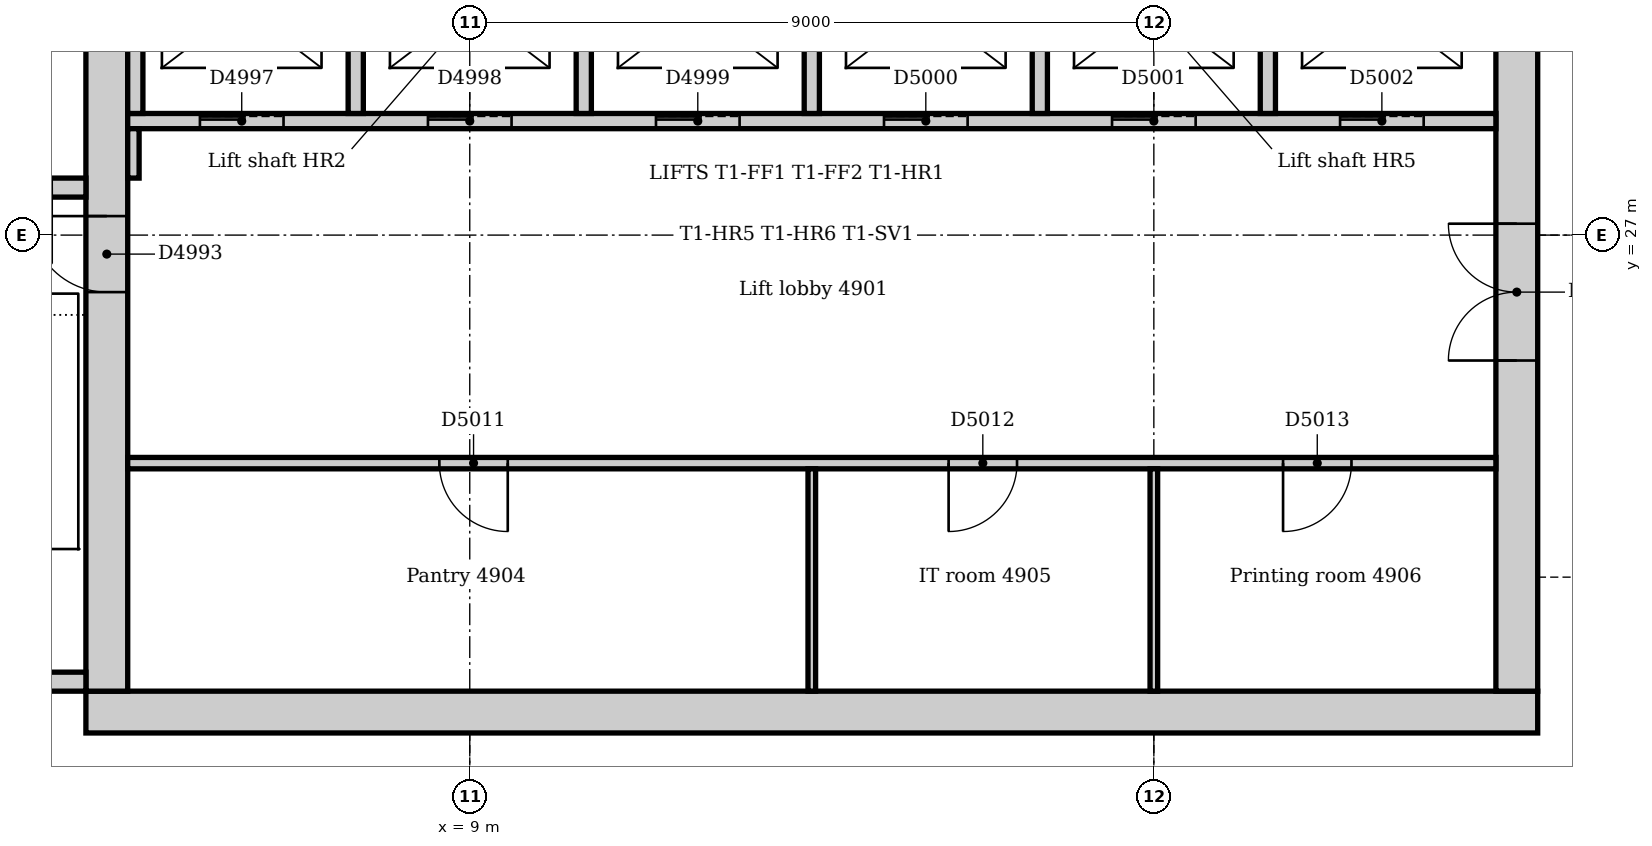
"""IFC4 building model, lengths in metres.
Left out: names, types, materials, properties, quantities, classifications, styles, units other than length and angle.
Written with IfcOpenShell. Run it as: python <this file> out.ifc"""

import sys

from ifc_helpers import new_model, si_unit, direction, frame, frame_2d, origin, place, context, subcontext, project, spatial, rectangle, extrude, element, fill, save


model = new_model("IFC4")
c1 = context("Model", 3, precision=1e-05, world=origin(), true_north=direction((0.0, 1.0)))
c2 = subcontext(c1, "Body", "Model", "MODEL_VIEW")
j1 = project(units=[si_unit("LENGTHUNIT", "METRE"), si_unit("PLANEANGLEUNIT", "RADIAN")], contexts=[c1])
p1 = place(None, origin())
s1 = spatial("IfcSite", under=j1, at=p1, CompositionType="ELEMENT")
p2 = place(p1, origin())
s2 = spatial("IfcBuilding", under=s1, at=p2, CompositionType="ELEMENT")
p3 = place(p2, frame((0.0, 0.0, 206.0)))
s3 = spatial("IfcBuildingStorey", under=s2, at=p3, CompositionType="ELEMENT", Elevation=206.0)
p4 = place(p3, frame((3.95, 20.725, 0.0), z_axis=(0.0, 0.0, 1.0), x_axis=(1.0, 0.0, 0.0)))
e1 = element("IfcWall", 1, at=p4, inside=s3, PredefinedType="SOLIDWALL", context=c2, shape_type="SweptSolid", body=[
    extrude(rectangle(XDim=19.1, YDim=0.55, at=frame_2d((9.55, 0.0))), origin(), (0.0, 0.0, 1.0), 4.0),
])
p5 = place(p3, frame((22.775, 21.0, 0.0), z_axis=(0.0, 0.0, 1.0), x_axis=(0.0, 1.0, 0.0)))
e2 = element("IfcWall", 2, at=p5, inside=s3, PredefinedType="SOLIDWALL", context=c2, shape_type="SweptSolid", body=[
    extrude(rectangle(XDim=10.5, YDim=0.55, at=frame_2d((5.25, 0.0))), origin(), (0.0, 0.0, 1.0), 4.0),
])
p6 = place(p5, frame((4.35, 0.0, 0.0)))
e3 = element("IfcOpeningElement", 3, at=p6, cuts=e2, PredefinedType="OPENING", context=c2, shape_type="SweptSolid", body=[
    extrude(rectangle(XDim=1.8, YDim=2.1, at=frame_2d((0.9, 1.05))), frame((0.0, 0.285, 0.0), z_axis=(0.0, -1.0, 0.0), x_axis=(1.0, 0.0, 0.0)), (0.0, 0.0, 1.0), 0.57),
])
p7 = place(p3, frame((4.225, 31.5, 0.0), z_axis=(0.0, 0.0, 1.0), x_axis=(0.0, -1.0, 0.0)))
e4 = element("IfcWall", 4, at=p7, inside=s3, PredefinedType="SOLIDWALL", context=c2, shape_type="SweptSolid", body=[
    extrude(rectangle(XDim=10.5, YDim=0.55, at=frame_2d((5.25, 0.0))), origin(), (0.0, 0.0, 1.0), 4.0),
])
p8 = place(p7, frame((4.25, 0.0, 0.0)))
e5 = element("IfcOpeningElement", 5, at=p8, cuts=e4, PredefinedType="OPENING", context=c2, shape_type="SweptSolid", body=[
    extrude(rectangle(XDim=1.0, YDim=2.1, at=frame_2d((0.5, 1.05))), frame((0.0, 0.285, 0.0), z_axis=(0.0, -1.0, 0.0), x_axis=(1.0, 0.0, 0.0)), (0.0, 0.0, 1.0), 0.57),
])
p9 = place(p3, frame((0.36, 21.125, 0.0), z_axis=(0.0, 0.0, 1.0), x_axis=(1.0, 0.0, 0.0)))
e6 = element("IfcWall", 6, at=p9, inside=s3, PredefinedType="SOLIDWALL", context=c2, shape_type="SweptSolid", body=[
    extrude(rectangle(XDim=3.59, YDim=0.25, at=frame_2d((1.795, 0.0))), origin(), (0.0, 0.0, 1.0), 4.0),
])
p10 = place(p3, frame((3.95, 27.625, 0.0), z_axis=(0.0, 0.0, 1.0), x_axis=(-1.0, 0.0, 0.0)))
e7 = element("IfcWall", 7, at=p10, inside=s3, PredefinedType="SOLIDWALL", context=c2, shape_type="SweptSolid", body=[
    extrude(rectangle(XDim=3.59, YDim=0.25, at=frame_2d((1.795, 0.0))), origin(), (0.0, 0.0, 1.0), 4.0),
])
p11 = place(p10, frame((0.45, 0.0, 0.0)))
e8 = element("IfcOpeningElement", 8, at=p11, cuts=e7, PredefinedType="OPENING", context=c2, shape_type="SweptSolid", body=[
    extrude(rectangle(XDim=1.0, YDim=2.1, at=frame_2d((0.5, 1.05))), frame((0.0, 0.135, 0.0), z_axis=(0.0, -1.0, 0.0), x_axis=(1.0, 0.0, 0.0)), (0.0, 0.0, 1.0), 0.27),
])
p12 = place(p3, frame((4.5, 28.5, 0.0), z_axis=(0.0, 0.0, 1.0), x_axis=(1.0, 0.0, 0.0)))
e9 = element("IfcWall", 9, at=p12, inside=s3, PredefinedType="PARTITIONING", context=c2, shape_type="SweptSolid", body=[
    extrude(rectangle(XDim=18.0, YDim=0.2, at=frame_2d((9.0, 0.0))), origin(), (0.0, 0.0, 1.0), 3.85),
])
p13 = place(p12, frame((0.95, 0.0, 0.0)))
e10 = element("IfcOpeningElement", 10, at=p13, cuts=e9, PredefinedType="OPENING", context=c2, shape_type="SweptSolid", body=[
    extrude(rectangle(XDim=1.1, YDim=2.1, at=frame_2d((0.55, 1.05))), frame((0.0, 0.11, 0.0), z_axis=(0.0, -1.0, 0.0), x_axis=(1.0, 0.0, 0.0)), (0.0, 0.0, 1.0), 0.22),
])
p14 = place(p12, frame((3.95, 0.0, 0.0)))
e11 = element("IfcOpeningElement", 11, at=p14, cuts=e9, PredefinedType="OPENING", context=c2, shape_type="SweptSolid", body=[
    extrude(rectangle(XDim=1.1, YDim=2.1, at=frame_2d((0.55, 1.05))), frame((0.0, 0.11, 0.0), z_axis=(0.0, -1.0, 0.0), x_axis=(1.0, 0.0, 0.0)), (0.0, 0.0, 1.0), 0.22),
])
p15 = place(p12, frame((6.95, 0.0, 0.0)))
e12 = element("IfcOpeningElement", 12, at=p15, cuts=e9, PredefinedType="OPENING", context=c2, shape_type="SweptSolid", body=[
    extrude(rectangle(XDim=1.1, YDim=2.1, at=frame_2d((0.55, 1.05))), frame((0.0, 0.11, 0.0), z_axis=(0.0, -1.0, 0.0), x_axis=(1.0, 0.0, 0.0)), (0.0, 0.0, 1.0), 0.22),
])
p16 = place(p12, frame((9.95, 0.0, 0.0)))
e13 = element("IfcOpeningElement", 13, at=p16, cuts=e9, PredefinedType="OPENING", context=c2, shape_type="SweptSolid", body=[
    extrude(rectangle(XDim=1.1, YDim=2.1, at=frame_2d((0.55, 1.05))), frame((0.0, 0.11, 0.0), z_axis=(0.0, -1.0, 0.0), x_axis=(1.0, 0.0, 0.0)), (0.0, 0.0, 1.0), 0.22),
])
p17 = place(p12, frame((12.95, 0.0, 0.0)))
e14 = element("IfcOpeningElement", 14, at=p17, cuts=e9, PredefinedType="OPENING", context=c2, shape_type="SweptSolid", body=[
    extrude(rectangle(XDim=1.1, YDim=2.1, at=frame_2d((0.55, 1.05))), frame((0.0, 0.11, 0.0), z_axis=(0.0, -1.0, 0.0), x_axis=(1.0, 0.0, 0.0)), (0.0, 0.0, 1.0), 0.22),
])
p18 = place(p12, frame((15.95, 0.0, 0.0)))
e15 = element("IfcOpeningElement", 15, at=p18, cuts=e9, PredefinedType="OPENING", context=c2, shape_type="SweptSolid", body=[
    extrude(rectangle(XDim=1.1, YDim=2.1, at=frame_2d((0.55, 1.05))), frame((0.0, 0.11, 0.0), z_axis=(0.0, -1.0, 0.0), x_axis=(1.0, 0.0, 0.0)), (0.0, 0.0, 1.0), 0.22),
])
for number, where, z_axis, x_axis in (
    (16, (10.5, 28.6, 0.0), (0.0, 0.0, 1.0), (0.0, 1.0, 0.0)),
    (17, (13.5, 28.6, 0.0), (0.0, 0.0, 1.0), (0.0, 1.0, 0.0)),
    (18, (16.5, 28.6, 0.0), (0.0, 0.0, 1.0), (0.0, 1.0, 0.0)),
    (19, (19.5, 28.6, 0.0), (0.0, 0.0, 1.0), (0.0, 1.0, 0.0)),
    (20, (4.6, 28.6, 0.0), (0.0, 0.0, 1.0), (0.0, 1.0, 0.0)),
    (21, (7.5, 28.6, 0.0), (0.0, 0.0, 1.0), (0.0, 1.0, 0.0)),
):
    element("IfcWall", number, at=place(p3, frame(where, z_axis=z_axis, x_axis=x_axis)), inside=s3, PredefinedType="PARTITIONING", context=c2, shape_type="SweptSolid", body=[
        extrude(rectangle(XDim=2.65, YDim=0.2, at=frame_2d((1.325, 0.0))), origin(), (0.0, 0.0, 1.0), 3.85),
    ])
p19 = place(p3, frame((4.5, 24.0, 0.0), z_axis=(0.0, 0.0, 1.0), x_axis=(1.0, 0.0, 0.0)))
e22 = element("IfcWall", 22, at=p19, inside=s3, PredefinedType="PARTITIONING", context=c2, shape_type="SweptSolid", body=[
    extrude(rectangle(XDim=18.0, YDim=0.15, at=frame_2d((9.0, 0.0))), origin(), (0.0, 0.0, 1.0), 3.85),
])
p20 = place(p19, frame((4.1, 0.0, 0.0)))
e23 = element("IfcOpeningElement", 23, at=p20, cuts=e22, PredefinedType="OPENING", context=c2, shape_type="SweptSolid", body=[
    extrude(rectangle(XDim=0.9, YDim=2.1, at=frame_2d((0.45, 1.05))), frame((0.0, 0.085, 0.0), z_axis=(0.0, -1.0, 0.0), x_axis=(1.0, 0.0, 0.0)), (0.0, 0.0, 1.0), 0.17),
])
p21 = place(p19, frame((10.8, 0.0, 0.0)))
e24 = element("IfcOpeningElement", 24, at=p21, cuts=e22, PredefinedType="OPENING", context=c2, shape_type="SweptSolid", body=[
    extrude(rectangle(XDim=0.9, YDim=2.1, at=frame_2d((0.45, 1.05))), frame((0.0, 0.085, 0.0), z_axis=(0.0, -1.0, 0.0), x_axis=(1.0, 0.0, 0.0)), (0.0, 0.0, 1.0), 0.17),
])
p22 = place(p19, frame((15.2, 0.0, 0.0)))
e25 = element("IfcOpeningElement", 25, at=p22, cuts=e22, PredefinedType="OPENING", context=c2, shape_type="SweptSolid", body=[
    extrude(rectangle(XDim=0.9, YDim=2.1, at=frame_2d((0.45, 1.05))), frame((0.0, 0.085, 0.0), z_axis=(0.0, -1.0, 0.0), x_axis=(1.0, 0.0, 0.0)), (0.0, 0.0, 1.0), 0.17),
])
p23 = place(p3, frame((4.575, 27.75, 0.0), z_axis=(0.0, 0.0, 1.0), x_axis=(0.0, 1.0, 0.0)))
e26 = element("IfcWall", 26, at=p23, inside=s3, PredefinedType="PARTITIONING", context=c2, shape_type="SweptSolid", body=[
    extrude(rectangle(XDim=0.65, YDim=0.15, at=frame_2d((0.325, 0.0))), origin(), (0.0, 0.0, 1.0), 3.85),
])
for number, where, z_axis, x_axis in (
    (27, (13.5, 21.0, 0.0), (0.0, 0.0, 1.0), (0.0, 1.0, 0.0)),
    (28, (18.0, 21.0, 0.0), (0.0, 0.0, 1.0), (0.0, 1.0, 0.0)),
):
    element("IfcWall", number, at=place(p3, frame(where, z_axis=z_axis, x_axis=x_axis)), inside=s3, PredefinedType="PARTITIONING", context=c2, shape_type="SweptSolid", body=[
        extrude(rectangle(XDim=2.925, YDim=0.1, at=frame_2d((1.462, 0.0))), origin(), (0.0, 0.0, 1.0), 3.85),
    ])
p24 = place(p8, frame((1.0, 0.0, 0.0), z_axis=(0.0, 0.0, 1.0), x_axis=(-1.0, 0.0, 0.0)))
e29 = element("IfcDoor", 29, at=p24, inside=s3, OperationType="SINGLE_SWING_RIGHT", PredefinedType="DOOR", context=c2, shape_type="SweptSolid", body=[
    extrude(rectangle(XDim=1.0, YDim=2.1, at=frame_2d((0.5, 1.05))), frame((0.0, 0.025, 0.0), z_axis=(0.0, -1.0, 0.0), x_axis=(1.0, 0.0, 0.0)), (0.0, 0.0, 1.0), 0.05),
])
fill(e5, e29)
p25 = place(p13, origin())
e30 = element("IfcDoor", 30, at=p25, inside=s3, OperationType="SLIDING_TO_LEFT", PredefinedType="DOOR", context=c2, shape_type="SweptSolid", body=[
    extrude(rectangle(XDim=1.1, YDim=2.1, at=frame_2d((0.55, 1.05))), frame((0.0, 0.025, 0.0), z_axis=(0.0, -1.0, 0.0), x_axis=(1.0, 0.0, 0.0)), (0.0, 0.0, 1.0), 0.05),
])
fill(e10, e30)
p26 = place(p14, origin())
e31 = element("IfcDoor", 31, at=p26, inside=s3, OperationType="SLIDING_TO_LEFT", PredefinedType="DOOR", context=c2, shape_type="SweptSolid", body=[
    extrude(rectangle(XDim=1.1, YDim=2.1, at=frame_2d((0.55, 1.05))), frame((0.0, 0.025, 0.0), z_axis=(0.0, -1.0, 0.0), x_axis=(1.0, 0.0, 0.0)), (0.0, 0.0, 1.0), 0.05),
])
fill(e11, e31)
p27 = place(p15, origin())
e32 = element("IfcDoor", 32, at=p27, inside=s3, OperationType="SLIDING_TO_LEFT", PredefinedType="DOOR", context=c2, shape_type="SweptSolid", body=[
    extrude(rectangle(XDim=1.1, YDim=2.1, at=frame_2d((0.55, 1.05))), frame((0.0, 0.025, 0.0), z_axis=(0.0, -1.0, 0.0), x_axis=(1.0, 0.0, 0.0)), (0.0, 0.0, 1.0), 0.05),
])
fill(e12, e32)
p28 = place(p16, origin())
e33 = element("IfcDoor", 33, at=p28, inside=s3, OperationType="SLIDING_TO_LEFT", PredefinedType="DOOR", context=c2, shape_type="SweptSolid", body=[
    extrude(rectangle(XDim=1.1, YDim=2.1, at=frame_2d((0.55, 1.05))), frame((0.0, 0.025, 0.0), z_axis=(0.0, -1.0, 0.0), x_axis=(1.0, 0.0, 0.0)), (0.0, 0.0, 1.0), 0.05),
])
fill(e13, e33)
p29 = place(p17, origin())
e34 = element("IfcDoor", 34, at=p29, inside=s3, OperationType="SLIDING_TO_LEFT", PredefinedType="DOOR", context=c2, shape_type="SweptSolid", body=[
    extrude(rectangle(XDim=1.1, YDim=2.1, at=frame_2d((0.55, 1.05))), frame((0.0, 0.025, 0.0), z_axis=(0.0, -1.0, 0.0), x_axis=(1.0, 0.0, 0.0)), (0.0, 0.0, 1.0), 0.05),
])
fill(e14, e34)
p30 = place(p18, origin())
e35 = element("IfcDoor", 35, at=p30, inside=s3, OperationType="SLIDING_TO_LEFT", PredefinedType="DOOR", context=c2, shape_type="SweptSolid", body=[
    extrude(rectangle(XDim=1.1, YDim=2.1, at=frame_2d((0.55, 1.05))), frame((0.0, 0.025, 0.0), z_axis=(0.0, -1.0, 0.0), x_axis=(1.0, 0.0, 0.0)), (0.0, 0.0, 1.0), 0.05),
])
fill(e15, e35)
p31 = place(p6, origin())
e36 = element("IfcDoor", 36, at=p31, inside=s3, OperationType="DOUBLE_DOOR_DOUBLE_SWING", PredefinedType="DOOR", context=c2, shape_type="SweptSolid", body=[
    extrude(rectangle(XDim=1.8, YDim=2.1, at=frame_2d((0.9, 1.05))), frame((0.0, 0.025, 0.0), z_axis=(0.0, -1.0, 0.0), x_axis=(1.0, 0.0, 0.0)), (0.0, 0.0, 1.0), 0.05),
])
fill(e3, e36)
p32 = place(p20, frame((0.9, 0.0, 0.0), z_axis=(0.0, 0.0, 1.0), x_axis=(-1.0, 0.0, 0.0)))
e37 = element("IfcDoor", 37, at=p32, inside=s3, OperationType="SINGLE_SWING_LEFT", PredefinedType="DOOR", context=c2, shape_type="SweptSolid", body=[
    extrude(rectangle(XDim=0.9, YDim=2.1, at=frame_2d((0.45, 1.05))), frame((0.0, 0.025, 0.0), z_axis=(0.0, -1.0, 0.0), x_axis=(1.0, 0.0, 0.0)), (0.0, 0.0, 1.0), 0.05),
])
fill(e23, e37)
p33 = place(p21, frame((0.9, 0.0, 0.0), z_axis=(0.0, 0.0, 1.0), x_axis=(-1.0, 0.0, 0.0)))
e38 = element("IfcDoor", 38, at=p33, inside=s3, OperationType="SINGLE_SWING_RIGHT", PredefinedType="DOOR", context=c2, shape_type="SweptSolid", body=[
    extrude(rectangle(XDim=0.9, YDim=2.1, at=frame_2d((0.45, 1.05))), frame((0.0, 0.025, 0.0), z_axis=(0.0, -1.0, 0.0), x_axis=(1.0, 0.0, 0.0)), (0.0, 0.0, 1.0), 0.05),
])
fill(e24, e38)
p34 = place(p22, frame((0.9, 0.0, 0.0), z_axis=(0.0, 0.0, 1.0), x_axis=(-1.0, 0.0, 0.0)))
e39 = element("IfcDoor", 39, at=p34, inside=s3, OperationType="SINGLE_SWING_RIGHT", PredefinedType="DOOR", context=c2, shape_type="SweptSolid", body=[
    extrude(rectangle(XDim=0.9, YDim=2.1, at=frame_2d((0.45, 1.05))), frame((0.0, 0.025, 0.0), z_axis=(0.0, -1.0, 0.0), x_axis=(1.0, 0.0, 0.0)), (0.0, 0.0, 1.0), 0.05),
])
fill(e25, e39)
save(model, sys.argv[1])
